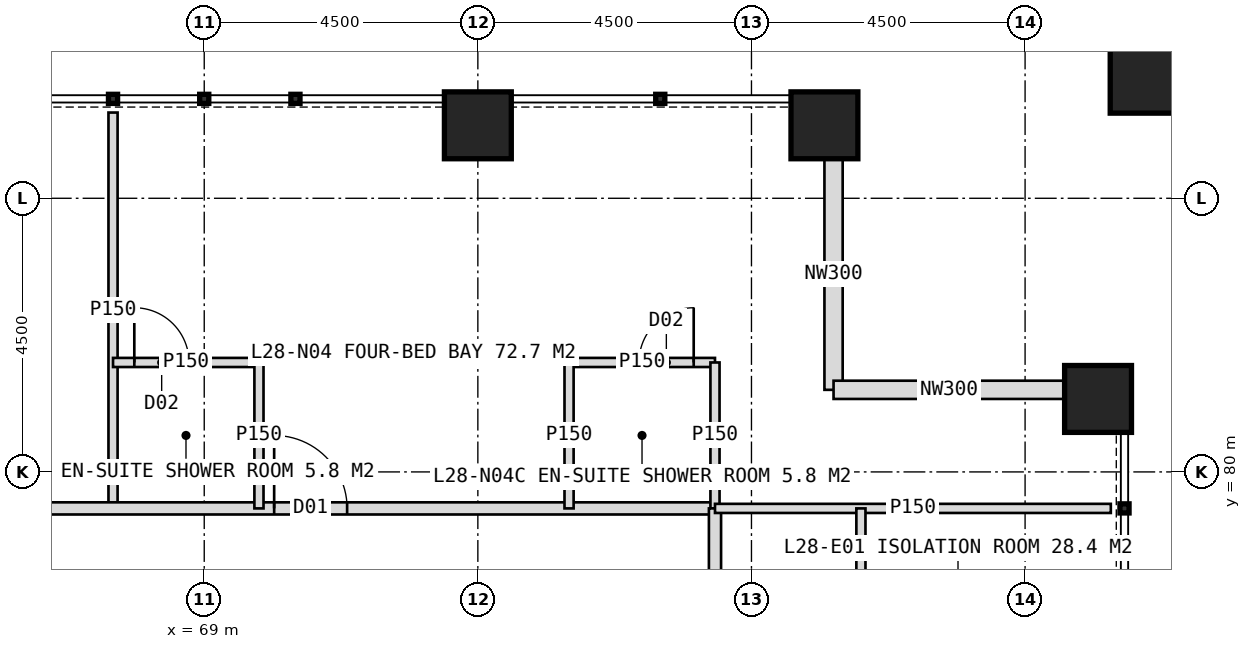
"""IFC4 building model, lengths in metres.
Left out: names, types, materials, properties, quantities, classifications, styles, units other than length and angle.
Written with IfcOpenShell. Run it as: python <this file> out.ifc"""

import sys

from ifc_helpers import new_model, si_unit, direction, frame, frame_2d, origin, origin_2d, place, context, subcontext, project, spatial, rectangle, hollow_rectangle, extrude, element, fill, save


model = new_model("IFC4")
c1 = context("Model", 3, precision=1e-05, world=origin(), true_north=direction((0.0, 1.0)))
c2 = subcontext(c1, "Body", "Model", "MODEL_VIEW")
j1 = project(units=[si_unit("LENGTHUNIT", "METRE"), si_unit("PLANEANGLEUNIT", "RADIAN")], contexts=[c1])
p1 = place(None, origin())
s1 = spatial("IfcSite", under=j1, at=p1, CompositionType="ELEMENT")
p2 = place(p1, origin())
s2 = spatial("IfcBuilding", under=s1, at=p2, CompositionType="ELEMENT")
p3 = place(p2, frame((0.0, 0.0, 120.0)))
s3 = spatial("IfcBuildingStorey", under=s2, at=p3, CompositionType="ELEMENT", Elevation=120.0)
for number, where, z_axis, x_axis in (
    (1, (73.5, 85.7, 0.0), (0.0, 0.0, 1.0), (1.0, 0.0, 0.0)),
    (2, (79.2, 85.7, 0.0), (0.0, 0.0, 1.0), (1.0, 0.0, 0.0)),
    (3, (83.7, 81.2, 0.0), (0.0, 0.0, 1.0), (1.0, 0.0, 0.0)),
):
    element("IfcColumn", number, at=place(p3, frame(where, z_axis=z_axis, x_axis=x_axis)), inside=s3, PredefinedType="COLUMN", context=c2, shape_type="SweptSolid", body=[
        extrude(hollow_rectangle(XDim=1.1, YDim=1.1, WallThickness=0.1, at=origin_2d()), origin(), (0.0, 0.0, 1.0), 4.0),
    ])
p4 = place(p3, frame((84.6, 86.6, 0.0), z_axis=(0.0, 0.0, 1.0), x_axis=(1.0, 0.0, 0.0)))
e4 = element("IfcColumn", 4, at=p4, inside=s3, PredefinedType="COLUMN", context=c2, shape_type="SweptSolid", body=[
    extrude(hollow_rectangle(XDim=1.4, YDim=1.4, WallThickness=0.08, at=origin_2d()), origin(), (0.0, 0.0, 1.0), 4.0),
])
for number, where, z_axis, x_axis in (
    (5, (79.35, 85.15, 0.0), (0.0, 0.0, 1.0), (0.0, -1.0, 0.0)),
    (6, (79.35, 81.35, 0.0), (0.0, 0.0, 1.0), (1.0, 0.0, 0.0)),
):
    element("IfcWall", number, at=place(p3, frame(where, z_axis=z_axis, x_axis=x_axis)), inside=s3, PredefinedType="ELEMENTEDWALL", context=c2, shape_type="SweptSolid", body=[
        extrude(rectangle(XDim=3.8, YDim=0.3, at=frame_2d((1.9, 0.0))), origin(), (0.0, 0.0, 1.0), 4.0),
    ])
p5 = place(p3, frame((67.5, 79.4, 0.0), z_axis=(0.0, 0.0, 1.0), x_axis=(0.0, 1.0, 0.0)))
e7 = element("IfcWall", 7, at=p5, inside=s3, PredefinedType="PARTITIONING", context=c2, shape_type="SweptSolid", body=[
    extrude(rectangle(XDim=6.51, YDim=0.15, at=frame_2d((3.255, 0.0))), origin(), (0.0, 0.0, 1.0), 3.75),
])
p6 = place(p3, frame((42.6, 79.4, 0.0), z_axis=(0.0, 0.0, 1.0), x_axis=(1.0, 0.0, 0.0)))
e8 = element("IfcWall", 8, at=p6, inside=s3, PredefinedType="PARTITIONING", context=c2, shape_type="SweptSolid", body=[
    extrude(rectangle(XDim=34.8, YDim=0.2, at=frame_2d((17.4, 0.0))), origin(), (0.0, 0.0, 1.0), 3.75),
])
p7 = place(p6, frame((2.45, 0.0, 0.0)))
e9 = element("IfcOpeningElement", 9, at=p7, cuts=e8, PredefinedType="OPENING", context=c2, shape_type="SweptSolid", body=[
    extrude(rectangle(XDim=1.2, YDim=2.2, at=frame_2d((0.6, 1.1))), frame((0.0, 0.11, 0.0), z_axis=(0.0, -1.0, 0.0), x_axis=(1.0, 0.0, 0.0)), (0.0, 0.0, 1.0), 0.22),
])
p8 = place(p6, frame((10.15, 0.0, 0.0)))
e10 = element("IfcOpeningElement", 10, at=p8, cuts=e8, PredefinedType="OPENING", context=c2, shape_type="SweptSolid", body=[
    extrude(rectangle(XDim=1.2, YDim=2.2, at=frame_2d((0.6, 1.1))), frame((0.0, 0.11, 0.0), z_axis=(0.0, -1.0, 0.0), x_axis=(1.0, 0.0, 0.0)), (0.0, 0.0, 1.0), 0.22),
])
p9 = place(p6, frame((19.8, 0.0, 0.0)))
e11 = element("IfcOpeningElement", 11, at=p9, cuts=e8, PredefinedType="OPENING", context=c2, shape_type="SweptSolid", body=[
    extrude(rectangle(XDim=1.2, YDim=2.2, at=frame_2d((0.6, 1.1))), frame((0.0, 0.11, 0.0), z_axis=(0.0, -1.0, 0.0), x_axis=(1.0, 0.0, 0.0)), (0.0, 0.0, 1.0), 0.22),
])
p10 = place(p6, frame((27.55, 0.0, 0.0)))
e12 = element("IfcOpeningElement", 12, at=p10, cuts=e8, PredefinedType="OPENING", context=c2, shape_type="SweptSolid", body=[
    extrude(rectangle(XDim=1.2, YDim=2.2, at=frame_2d((0.6, 1.1))), frame((0.0, 0.11, 0.0), z_axis=(0.0, -1.0, 0.0), x_axis=(1.0, 0.0, 0.0)), (0.0, 0.0, 1.0), 0.22),
])
p11 = place(p3, frame((67.5, 81.8, 0.0), z_axis=(0.0, 0.0, 1.0), x_axis=(1.0, 0.0, 0.0)))
e13 = element("IfcWall", 13, at=p11, inside=s3, PredefinedType="PARTITIONING", context=c2, shape_type="SweptSolid", body=[
    extrude(rectangle(XDim=2.4, YDim=0.15, at=frame_2d((1.2, 0.0))), origin(), (0.0, 0.0, 1.0), 3.75),
])
p12 = place(p11, frame((0.35, 0.0, 0.0)))
e14 = element("IfcOpeningElement", 14, at=p12, cuts=e13, PredefinedType="OPENING", context=c2, shape_type="SweptSolid", body=[
    extrude(rectangle(XDim=0.9, YDim=2.1, at=frame_2d((0.45, 1.05))), frame((0.0, 0.085, 0.0), z_axis=(0.0, -1.0, 0.0), x_axis=(1.0, 0.0, 0.0)), (0.0, 0.0, 1.0), 0.17),
])
p13 = place(p3, frame((69.9, 79.4, 0.0), z_axis=(0.0, 0.0, 1.0), x_axis=(0.0, 1.0, 0.0)))
e15 = element("IfcWall", 15, at=p13, inside=s3, PredefinedType="PARTITIONING", context=c2, shape_type="SweptSolid", body=[
    extrude(rectangle(XDim=2.4, YDim=0.15, at=frame_2d((1.2, 0.0))), origin(), (0.0, 0.0, 1.0), 3.75),
])
p14 = place(p3, frame((75.0, 81.8, 0.0), z_axis=(0.0, 0.0, 1.0), x_axis=(1.0, 0.0, 0.0)))
e16 = element("IfcWall", 16, at=p14, inside=s3, PredefinedType="PARTITIONING", context=c2, shape_type="SweptSolid", body=[
    extrude(rectangle(XDim=2.4, YDim=0.15, at=frame_2d((1.2, 0.0))), origin(), (0.0, 0.0, 1.0), 3.75),
])
p15 = place(p14, frame((1.15, 0.0, 0.0)))
e17 = element("IfcOpeningElement", 17, at=p15, cuts=e16, PredefinedType="OPENING", context=c2, shape_type="SweptSolid", body=[
    extrude(rectangle(XDim=0.9, YDim=2.1, at=frame_2d((0.45, 1.05))), frame((0.0, 0.085, 0.0), z_axis=(0.0, -1.0, 0.0), x_axis=(1.0, 0.0, 0.0)), (0.0, 0.0, 1.0), 0.17),
])
for number, where, z_axis, x_axis in (
    (18, (75.0, 79.4, 0.0), (0.0, 0.0, 1.0), (0.0, 1.0, 0.0)),
    (19, (77.4, 79.4, 0.0), (0.0, 0.0, 1.0), (0.0, 1.0, 0.0)),
):
    element("IfcWall", number, at=place(p3, frame(where, z_axis=z_axis, x_axis=x_axis)), inside=s3, PredefinedType="PARTITIONING", context=c2, shape_type="SweptSolid", body=[
        extrude(rectangle(XDim=2.4, YDim=0.15, at=frame_2d((1.2, 0.0))), origin(), (0.0, 0.0, 1.0), 3.75),
    ])
p16 = place(p3, frame((77.4, 79.4, 0.0), z_axis=(0.0, 0.0, 1.0), x_axis=(0.0, -1.0, 0.0)))
e20 = element("IfcWall", 20, at=p16, inside=s3, PredefinedType="PARTITIONING", context=c2, shape_type="SweptSolid", body=[
    extrude(rectangle(XDim=34.8, YDim=0.2, at=frame_2d((17.4, 0.0))), origin(), (0.0, 0.0, 1.0), 3.75),
])
p17 = place(p16, frame((2.45, 0.0, 0.0)))
e21 = element("IfcOpeningElement", 21, at=p17, cuts=e20, PredefinedType="OPENING", context=c2, shape_type="SweptSolid", body=[
    extrude(rectangle(XDim=1.2, YDim=2.2, at=frame_2d((0.6, 1.1))), frame((0.0, 0.11, 0.0), z_axis=(0.0, -1.0, 0.0), x_axis=(1.0, 0.0, 0.0)), (0.0, 0.0, 1.0), 0.22),
])
p18 = place(p16, frame((10.15, 0.0, 0.0)))
e22 = element("IfcOpeningElement", 22, at=p18, cuts=e20, PredefinedType="OPENING", context=c2, shape_type="SweptSolid", body=[
    extrude(rectangle(XDim=1.2, YDim=2.2, at=frame_2d((0.6, 1.1))), frame((0.0, 0.11, 0.0), z_axis=(0.0, -1.0, 0.0), x_axis=(1.0, 0.0, 0.0)), (0.0, 0.0, 1.0), 0.22),
])
p19 = place(p16, frame((19.55, 0.0, 0.0)))
e23 = element("IfcOpeningElement", 23, at=p19, cuts=e20, PredefinedType="OPENING", context=c2, shape_type="SweptSolid", body=[
    extrude(rectangle(XDim=1.2, YDim=2.2, at=frame_2d((0.6, 1.1))), frame((0.0, 0.11, 0.0), z_axis=(0.0, -1.0, 0.0), x_axis=(1.0, 0.0, 0.0)), (0.0, 0.0, 1.0), 0.22),
])
p20 = place(p16, frame((26.05, 0.0, 0.0)))
e24 = element("IfcOpeningElement", 24, at=p20, cuts=e20, PredefinedType="OPENING", context=c2, shape_type="SweptSolid", body=[
    extrude(rectangle(XDim=1.2, YDim=2.2, at=frame_2d((0.6, 1.1))), frame((0.0, 0.11, 0.0), z_axis=(0.0, -1.0, 0.0), x_axis=(1.0, 0.0, 0.0)), (0.0, 0.0, 1.0), 0.22),
])
p21 = place(p3, frame((77.4, 79.4, 0.0), z_axis=(0.0, 0.0, 1.0), x_axis=(1.0, 0.0, 0.0)))
e25 = element("IfcWall", 25, at=p21, inside=s3, PredefinedType="PARTITIONING", context=c2, shape_type="SweptSolid", body=[
    extrude(rectangle(XDim=6.51, YDim=0.15, at=frame_2d((3.255, 0.0))), origin(), (0.0, 0.0, 1.0), 3.75),
])
p22 = place(p3, frame((79.8, 79.4, 0.0), z_axis=(0.0, 0.0, 1.0), x_axis=(0.0, -1.0, 0.0)))
e26 = element("IfcWall", 26, at=p22, inside=s3, PredefinedType="PARTITIONING", context=c2, shape_type="SweptSolid", body=[
    extrude(rectangle(XDim=3.9, YDim=0.15, at=frame_2d((1.95, 0.0))), origin(), (0.0, 0.0, 1.0), 3.75),
])
p23 = place(p22, frame((2.45, 0.0, 0.0)))
e27 = element("IfcOpeningElement", 27, at=p23, cuts=e26, PredefinedType="OPENING", context=c2, shape_type="SweptSolid", body=[
    extrude(rectangle(XDim=1.2, YDim=2.2, at=frame_2d((0.6, 1.1))), frame((0.0, 0.085, 0.0), z_axis=(0.0, -1.0, 0.0), x_axis=(1.0, 0.0, 0.0)), (0.0, 0.0, 1.0), 0.17),
])
p24 = place(p10, origin())
e28 = element("IfcDoor", 28, at=p24, inside=s3, OperationType="SINGLE_SWING_LEFT", PredefinedType="DOOR", context=c2, shape_type="SweptSolid", body=[
    extrude(rectangle(XDim=1.2, YDim=2.2, at=frame_2d((0.6, 1.1))), frame((0.0, 0.025, 0.0), z_axis=(0.0, -1.0, 0.0), x_axis=(1.0, 0.0, 0.0)), (0.0, 0.0, 1.0), 0.05),
])
fill(e12, e28)
p25 = place(p12, origin())
e29 = element("IfcDoor", 29, at=p25, inside=s3, OperationType="SINGLE_SWING_LEFT", PredefinedType="DOOR", context=c2, shape_type="SweptSolid", body=[
    extrude(rectangle(XDim=0.9, YDim=2.1, at=frame_2d((0.45, 1.05))), frame((0.0, 0.025, 0.0), z_axis=(0.0, -1.0, 0.0), x_axis=(1.0, 0.0, 0.0)), (0.0, 0.0, 1.0), 0.05),
])
fill(e14, e29)
p26 = place(p15, origin())
e30 = element("IfcDoor", 30, at=p26, inside=s3, OperationType="SINGLE_SWING_RIGHT", PredefinedType="DOOR", context=c2, shape_type="SweptSolid", body=[
    extrude(rectangle(XDim=0.9, YDim=2.1, at=frame_2d((0.45, 1.05))), frame((0.0, 0.025, 0.0), z_axis=(0.0, -1.0, 0.0), x_axis=(1.0, 0.0, 0.0)), (0.0, 0.0, 1.0), 0.05),
])
fill(e17, e30)
save(model, sys.argv[1])
